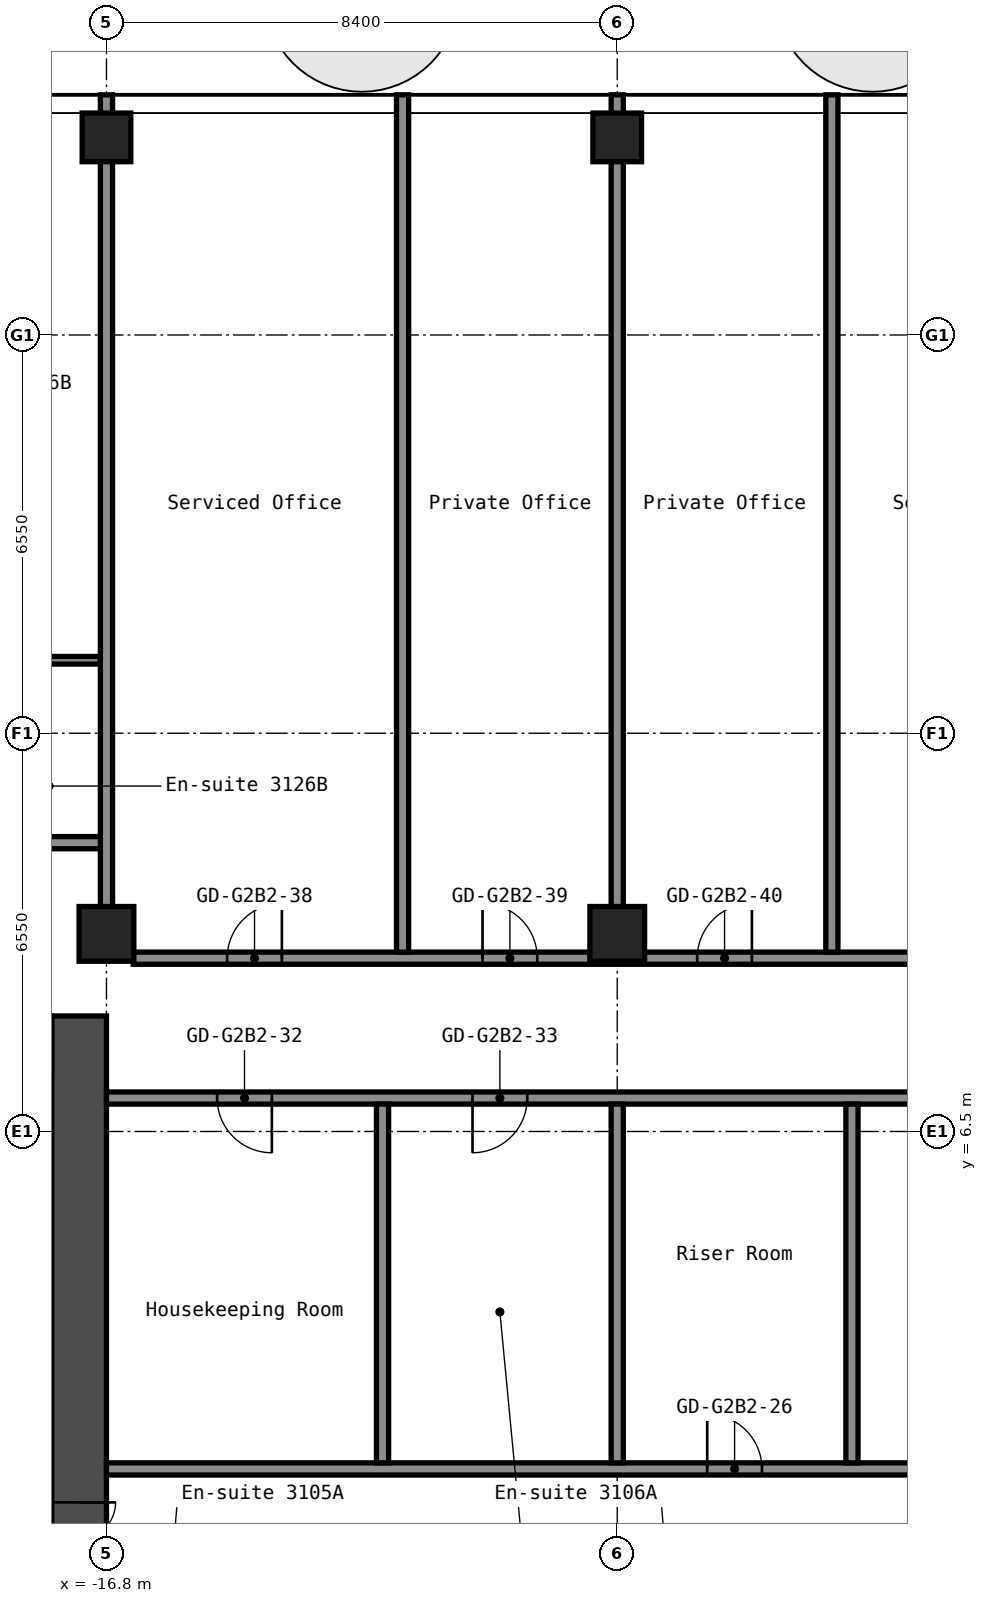
"""IFC4 building model, lengths in metres.
Left out: names, types, materials, properties, quantities, classifications, styles, units other than length and angle.
Written with IfcOpenShell. Run it as: python <this file> out.ifc"""

import sys

from ifc_helpers import new_model, si_unit, direction, frame, frame_2d, origin, origin_2d, place, context, subcontext, project, spatial, rectangle, hollow_rectangle, extrude, element, fill, save


model = new_model("IFC4")
c1 = context("Model", 3, precision=1e-05, world=origin(), true_north=direction((0.0, 1.0)))
c2 = subcontext(c1, "Body", "Model", "MODEL_VIEW")
j1 = project(units=[si_unit("LENGTHUNIT", "METRE"), si_unit("PLANEANGLEUNIT", "RADIAN")], contexts=[c1])
p1 = place(None, origin())
s1 = spatial("IfcSite", under=j1, at=p1, CompositionType="ELEMENT")
p2 = place(p1, origin())
s2 = spatial("IfcBuilding", under=s1, at=p2, CompositionType="ELEMENT")
p3 = place(p2, frame((0.0, 0.0, 110.6)))
s3 = spatial("IfcBuildingStorey", under=s2, at=p3, CompositionType="ELEMENT", Elevation=110.6)
p4 = place(p3, frame((-16.8, 9.75, 0.0), z_axis=(0.0, 0.0, 1.0), x_axis=(1.0, 0.0, 0.0)))
e1 = element("IfcColumn", 1, at=p4, inside=s3, PredefinedType="COLUMN", context=c2, shape_type="SweptSolid", body=[
    extrude(hollow_rectangle(XDim=0.9, YDim=0.9, WallThickness=0.036, at=origin_2d()), origin(), (0.0, 0.0, 1.0), 2.8),
])
p5 = place(p3, frame((-16.8, 22.85, 0.0), z_axis=(0.0, 0.0, 1.0), x_axis=(1.0, 0.0, 0.0)))
e2 = element("IfcColumn", 2, at=p5, inside=s3, PredefinedType="COLUMN", context=c2, shape_type="SweptSolid", body=[
    extrude(hollow_rectangle(XDim=0.8, YDim=0.8, WallThickness=0.032, at=origin_2d()), origin(), (0.0, 0.0, 1.0), 2.8),
])
p6 = place(p3, frame((-8.4, 9.75, 0.0), z_axis=(0.0, 0.0, 1.0), x_axis=(1.0, 0.0, 0.0)))
e3 = element("IfcColumn", 3, at=p6, inside=s3, PredefinedType="COLUMN", context=c2, shape_type="SweptSolid", body=[
    extrude(hollow_rectangle(XDim=0.9, YDim=0.9, WallThickness=0.036, at=origin_2d()), origin(), (0.0, 0.0, 1.0), 2.8),
])
p7 = place(p3, frame((-8.4, 22.85, 0.0), z_axis=(0.0, 0.0, 1.0), x_axis=(1.0, 0.0, 0.0)))
e4 = element("IfcColumn", 4, at=p7, inside=s3, PredefinedType="COLUMN", context=c2, shape_type="SweptSolid", body=[
    extrude(hollow_rectangle(XDim=0.8, YDim=0.8, WallThickness=0.032, at=origin_2d()), origin(), (0.0, 0.0, 1.0), 2.8),
])
p8 = place(p3, frame((-17.25, -8.4, 0.0), z_axis=(0.0, 0.0, 1.0), x_axis=(0.0, 1.0, 0.0)))
e5 = element("IfcWall", 5, at=p8, inside=s3, PredefinedType="SHEAR", context=c2, shape_type="SweptSolid", body=[
    extrude(rectangle(XDim=16.8, YDim=0.9, at=frame_2d((8.4, 0.0))), origin(), (0.0, 0.0, 1.0), 2.8),
])
p9 = place(p8, frame((7.6, 0.0, 0.0)))
e6 = element("IfcOpeningElement", 6, at=p9, cuts=e5, PredefinedType="OPENING", context=c2, shape_type="SweptSolid", body=[
    extrude(rectangle(XDim=1.2, YDim=2.1, at=frame_2d((0.6, 1.05))), frame((0.0, 0.46, 0.0), z_axis=(0.0, -1.0, 0.0), x_axis=(1.0, 0.0, 0.0)), (0.0, 0.0, 1.0), 0.92),
])
p10 = place(p3, frame((-32.7, 7.95, 0.0), z_axis=(0.0, 0.0, 1.0), x_axis=(1.0, 0.0, 0.0)))
e7 = element("IfcWall", 7, at=p10, inside=s3, PredefinedType="SHEAR", context=c2, shape_type="SweptSolid", body=[
    extrude(rectangle(XDim=15.0, YDim=0.9, at=frame_2d((7.5, 0.0))), origin(), (0.0, 0.0, 1.0), 2.8),
])
p11 = place(p10, frame((3.4, 0.0, 0.0)))
e8 = element("IfcOpeningElement", 8, at=p11, cuts=e7, PredefinedType="OPENING", context=c2, shape_type="SweptSolid", body=[
    extrude(rectangle(XDim=1.2, YDim=2.1, at=frame_2d((0.6, 1.05))), frame((0.0, 0.46, 0.0), z_axis=(0.0, -1.0, 0.0), x_axis=(1.0, 0.0, 0.0)), (0.0, 0.0, 1.0), 0.92),
])
p12 = place(p10, frame((0.75, 0.0, 0.0)))
e9 = element("IfcOpeningElement", 9, at=p12, cuts=e7, PredefinedType="OPENING", context=c2, shape_type="SweptSolid", body=[
    extrude(rectangle(XDim=0.9, YDim=2.1, at=frame_2d((0.45, 1.05))), frame((0.0, 0.46, 0.0), z_axis=(0.0, -1.0, 0.0), x_axis=(1.0, 0.0, 0.0)), (0.0, 0.0, 1.0), 0.92),
])
p13 = place(p3, frame((-16.8, 0.95, 0.0), z_axis=(0.0, 0.0, 1.0), x_axis=(1.0, 0.0, 0.0)))
e10 = element("IfcWall", 10, at=p13, inside=s3, PredefinedType="PARTITIONING", context=c2, shape_type="SweptSolid", body=[
    extrude(rectangle(XDim=33.6, YDim=0.2, at=frame_2d((16.8, 0.0))), origin(), (0.0, 0.0, 1.0), 2.8),
])
p14 = place(p13, frame((9.88, 0.0, 0.0)))
e11 = element("IfcOpeningElement", 11, at=p14, cuts=e10, PredefinedType="OPENING", context=c2, shape_type="SweptSolid", body=[
    extrude(rectangle(XDim=0.9, YDim=2.1, at=frame_2d((0.45, 1.05))), frame((0.0, 0.11, 0.0), z_axis=(0.0, -1.0, 0.0), x_axis=(1.0, 0.0, 0.0)), (0.0, 0.0, 1.0), 0.22),
])
p15 = place(p13, frame((14.08, 0.0, 0.0)))
e12 = element("IfcOpeningElement", 12, at=p15, cuts=e10, PredefinedType="OPENING", context=c2, shape_type="SweptSolid", body=[
    extrude(rectangle(XDim=0.9, YDim=2.1, at=frame_2d((0.45, 1.05))), frame((0.0, 0.11, 0.0), z_axis=(0.0, -1.0, 0.0), x_axis=(1.0, 0.0, 0.0)), (0.0, 0.0, 1.0), 0.22),
])
p16 = place(p13, frame((26.345, 0.0, 0.0)))
e13 = element("IfcOpeningElement", 13, at=p16, cuts=e10, PredefinedType="OPENING", context=c2, shape_type="SweptSolid", body=[
    extrude(rectangle(XDim=0.9, YDim=2.1, at=frame_2d((0.45, 1.05))), frame((0.0, 0.11, 0.0), z_axis=(0.0, -1.0, 0.0), x_axis=(1.0, 0.0, 0.0)), (0.0, 0.0, 1.0), 0.22),
])
p17 = place(p13, frame((30.545, 0.0, 0.0)))
e14 = element("IfcOpeningElement", 14, at=p17, cuts=e10, PredefinedType="OPENING", context=c2, shape_type="SweptSolid", body=[
    extrude(rectangle(XDim=0.9, YDim=2.1, at=frame_2d((0.45, 1.05))), frame((0.0, 0.11, 0.0), z_axis=(0.0, -1.0, 0.0), x_axis=(1.0, 0.0, 0.0)), (0.0, 0.0, 1.0), 0.22),
])
p18 = place(p3, frame((-16.8, 7.05, 0.0), z_axis=(0.0, 0.0, 1.0), x_axis=(1.0, 0.0, 0.0)))
e15 = element("IfcWall", 15, at=p18, inside=s3, PredefinedType="PARTITIONING", context=c2, shape_type="SweptSolid", body=[
    extrude(rectangle(XDim=33.6, YDim=0.2, at=frame_2d((16.8, 0.0))), origin(), (0.0, 0.0, 1.0), 2.8),
])
p19 = place(p18, frame((1.82, 0.0, 0.0)))
e16 = element("IfcOpeningElement", 16, at=p19, cuts=e15, PredefinedType="OPENING", context=c2, shape_type="SweptSolid", body=[
    extrude(rectangle(XDim=0.9, YDim=2.1, at=frame_2d((0.45, 1.05))), frame((0.0, 0.11, 0.0), z_axis=(0.0, -1.0, 0.0), x_axis=(1.0, 0.0, 0.0)), (0.0, 0.0, 1.0), 0.22),
])
p20 = place(p18, frame((6.02, 0.0, 0.0)))
e17 = element("IfcOpeningElement", 17, at=p20, cuts=e15, PredefinedType="OPENING", context=c2, shape_type="SweptSolid", body=[
    extrude(rectangle(XDim=0.9, YDim=2.1, at=frame_2d((0.45, 1.05))), frame((0.0, 0.11, 0.0), z_axis=(0.0, -1.0, 0.0), x_axis=(1.0, 0.0, 0.0)), (0.0, 0.0, 1.0), 0.22),
])
p21 = place(p18, frame((18.2, 0.0, 0.0)))
e18 = element("IfcOpeningElement", 18, at=p21, cuts=e15, PredefinedType="OPENING", context=c2, shape_type="SweptSolid", body=[
    extrude(rectangle(XDim=0.9, YDim=2.1, at=frame_2d((0.45, 1.05))), frame((0.0, 0.11, 0.0), z_axis=(0.0, -1.0, 0.0), x_axis=(1.0, 0.0, 0.0)), (0.0, 0.0, 1.0), 0.22),
])
p22 = place(p18, frame((22.4, 0.0, 0.0)))
e19 = element("IfcOpeningElement", 19, at=p22, cuts=e15, PredefinedType="OPENING", context=c2, shape_type="SweptSolid", body=[
    extrude(rectangle(XDim=0.9, YDim=2.1, at=frame_2d((0.45, 1.05))), frame((0.0, 0.11, 0.0), z_axis=(0.0, -1.0, 0.0), x_axis=(1.0, 0.0, 0.0)), (0.0, 0.0, 1.0), 0.22),
])
p23 = place(p3, frame((-16.36, 9.35, 0.0), z_axis=(0.0, 0.0, 1.0), x_axis=(1.0, 0.0, 0.0)))
e20 = element("IfcWall", 20, at=p23, inside=s3, PredefinedType="PARTITIONING", context=c2, shape_type="SweptSolid", body=[
    extrude(rectangle(XDim=32.72, YDim=0.2, at=frame_2d((16.36, 0.0))), origin(), (0.0, 0.0, 1.0), 2.8),
])
p24 = place(p23, frame((1.545, 0.0, 0.0)))
e21 = element("IfcOpeningElement", 21, at=p24, cuts=e20, PredefinedType="OPENING", context=c2, shape_type="SweptSolid", body=[
    extrude(rectangle(XDim=0.9, YDim=2.1, at=frame_2d((0.45, 1.05))), frame((0.0, 0.11, 0.0), z_axis=(0.0, -1.0, 0.0), x_axis=(1.0, 0.0, 0.0)), (0.0, 0.0, 1.0), 0.22),
])
p25 = place(p23, frame((5.745, 0.0, 0.0)))
e22 = element("IfcOpeningElement", 22, at=p25, cuts=e20, PredefinedType="OPENING", context=c2, shape_type="SweptSolid", body=[
    extrude(rectangle(XDim=0.9, YDim=2.1, at=frame_2d((0.45, 1.05))), frame((0.0, 0.11, 0.0), z_axis=(0.0, -1.0, 0.0), x_axis=(1.0, 0.0, 0.0)), (0.0, 0.0, 1.0), 0.22),
])
p26 = place(p23, frame((9.275, 0.0, 0.0)))
e23 = element("IfcOpeningElement", 23, at=p26, cuts=e20, PredefinedType="OPENING", context=c2, shape_type="SweptSolid", body=[
    extrude(rectangle(XDim=0.9, YDim=2.1, at=frame_2d((0.45, 1.05))), frame((0.0, 0.11, 0.0), z_axis=(0.0, -1.0, 0.0), x_axis=(1.0, 0.0, 0.0)), (0.0, 0.0, 1.0), 0.22),
])
p27 = place(p23, frame((13.475, 0.0, 0.0)))
e24 = element("IfcOpeningElement", 24, at=p27, cuts=e20, PredefinedType="OPENING", context=c2, shape_type="SweptSolid", body=[
    extrude(rectangle(XDim=0.9, YDim=2.1, at=frame_2d((0.45, 1.05))), frame((0.0, 0.11, 0.0), z_axis=(0.0, -1.0, 0.0), x_axis=(1.0, 0.0, 0.0)), (0.0, 0.0, 1.0), 0.22),
])
p28 = place(p23, frame((19.21, 0.0, 0.0)))
e25 = element("IfcOpeningElement", 25, at=p28, cuts=e20, PredefinedType="OPENING", context=c2, shape_type="SweptSolid", body=[
    extrude(rectangle(XDim=1.0, YDim=2.1, at=frame_2d((0.5, 1.05))), frame((0.0, 0.11, 0.0), z_axis=(0.0, -1.0, 0.0), x_axis=(1.0, 0.0, 0.0)), (0.0, 0.0, 1.0), 0.22),
])
p29 = place(p23, frame((20.91, 0.0, 0.0)))
e26 = element("IfcOpeningElement", 26, at=p29, cuts=e20, PredefinedType="OPENING", context=c2, shape_type="SweptSolid", body=[
    extrude(rectangle(XDim=1.0, YDim=2.1, at=frame_2d((0.5, 1.05))), frame((0.0, 0.11, 0.0), z_axis=(0.0, -1.0, 0.0), x_axis=(1.0, 0.0, 0.0)), (0.0, 0.0, 1.0), 0.22),
])
p30 = place(p23, frame((27.61, 0.0, 0.0)))
e27 = element("IfcOpeningElement", 27, at=p30, cuts=e20, PredefinedType="OPENING", context=c2, shape_type="SweptSolid", body=[
    extrude(rectangle(XDim=1.0, YDim=2.1, at=frame_2d((0.5, 1.05))), frame((0.0, 0.11, 0.0), z_axis=(0.0, -1.0, 0.0), x_axis=(1.0, 0.0, 0.0)), (0.0, 0.0, 1.0), 0.22),
])
p31 = place(p23, frame((29.31, 0.0, 0.0)))
e28 = element("IfcOpeningElement", 28, at=p31, cuts=e20, PredefinedType="OPENING", context=c2, shape_type="SweptSolid", body=[
    extrude(rectangle(XDim=1.0, YDim=2.1, at=frame_2d((0.5, 1.05))), frame((0.0, 0.11, 0.0), z_axis=(0.0, -1.0, 0.0), x_axis=(1.0, 0.0, 0.0)), (0.0, 0.0, 1.0), 0.22),
])
p32 = place(p3, frame((-46.5, 11.25, 0.0), z_axis=(0.0, 0.0, 1.0), x_axis=(1.0, 0.0, 0.0)))
e29 = element("IfcWall", 29, at=p32, inside=s3, PredefinedType="PARTITIONING", context=c2, shape_type="SweptSolid", body=[
    extrude(rectangle(XDim=29.7, YDim=0.2, at=frame_2d((14.85, 0.0))), origin(), (0.0, 0.0, 1.0), 2.8),
])
p33 = place(p32, frame((1.95, 0.0, 0.0)))
e30 = element("IfcOpeningElement", 30, at=p33, cuts=e29, PredefinedType="OPENING", context=c2, shape_type="SweptSolid", body=[
    extrude(rectangle(XDim=0.9, YDim=2.1, at=frame_2d((0.45, 1.05))), frame((0.0, 0.11, 0.0), z_axis=(0.0, -1.0, 0.0), x_axis=(1.0, 0.0, 0.0)), (0.0, 0.0, 1.0), 0.22),
])
p34 = place(p32, frame((7.35, 0.0, 0.0)))
e31 = element("IfcOpeningElement", 31, at=p34, cuts=e29, PredefinedType="OPENING", context=c2, shape_type="SweptSolid", body=[
    extrude(rectangle(XDim=1.0, YDim=2.1, at=frame_2d((0.5, 1.05))), frame((0.0, 0.11, 0.0), z_axis=(0.0, -1.0, 0.0), x_axis=(1.0, 0.0, 0.0)), (0.0, 0.0, 1.0), 0.22),
])
p35 = place(p32, frame((9.05, 0.0, 0.0)))
e32 = element("IfcOpeningElement", 32, at=p35, cuts=e29, PredefinedType="OPENING", context=c2, shape_type="SweptSolid", body=[
    extrude(rectangle(XDim=1.0, YDim=2.1, at=frame_2d((0.5, 1.05))), frame((0.0, 0.11, 0.0), z_axis=(0.0, -1.0, 0.0), x_axis=(1.0, 0.0, 0.0)), (0.0, 0.0, 1.0), 0.22),
])
p36 = place(p32, frame((15.75, 0.0, 0.0)))
e33 = element("IfcOpeningElement", 33, at=p36, cuts=e29, PredefinedType="OPENING", context=c2, shape_type="SweptSolid", body=[
    extrude(rectangle(XDim=1.0, YDim=2.1, at=frame_2d((0.5, 1.05))), frame((0.0, 0.11, 0.0), z_axis=(0.0, -1.0, 0.0), x_axis=(1.0, 0.0, 0.0)), (0.0, 0.0, 1.0), 0.22),
])
p37 = place(p32, frame((17.45, 0.0, 0.0)))
e34 = element("IfcOpeningElement", 34, at=p37, cuts=e29, PredefinedType="OPENING", context=c2, shape_type="SweptSolid", body=[
    extrude(rectangle(XDim=1.0, YDim=2.1, at=frame_2d((0.5, 1.05))), frame((0.0, 0.11, 0.0), z_axis=(0.0, -1.0, 0.0), x_axis=(1.0, 0.0, 0.0)), (0.0, 0.0, 1.0), 0.22),
])
p38 = place(p32, frame((24.15, 0.0, 0.0)))
e35 = element("IfcOpeningElement", 35, at=p38, cuts=e29, PredefinedType="OPENING", context=c2, shape_type="SweptSolid", body=[
    extrude(rectangle(XDim=1.0, YDim=2.1, at=frame_2d((0.5, 1.05))), frame((0.0, 0.11, 0.0), z_axis=(0.0, -1.0, 0.0), x_axis=(1.0, 0.0, 0.0)), (0.0, 0.0, 1.0), 0.22),
])
p39 = place(p32, frame((25.85, 0.0, 0.0)))
e36 = element("IfcOpeningElement", 36, at=p39, cuts=e29, PredefinedType="OPENING", context=c2, shape_type="SweptSolid", body=[
    extrude(rectangle(XDim=1.0, YDim=2.1, at=frame_2d((0.5, 1.05))), frame((0.0, 0.11, 0.0), z_axis=(0.0, -1.0, 0.0), x_axis=(1.0, 0.0, 0.0)), (0.0, 0.0, 1.0), 0.22),
])
p40 = place(p3, frame((-19.238, 14.25, 0.0), z_axis=(0.0, 0.0, 1.0), x_axis=(1.0, 0.0, 0.0)))
e37 = element("IfcWall", 37, at=p40, inside=s3, PredefinedType="PARTITIONING", context=c2, shape_type="SweptSolid", body=[
    extrude(rectangle(XDim=2.338, YDim=0.125, at=frame_2d((1.169, 0.0))), origin(), (0.0, 0.0, 1.0), 2.8),
])
p41 = place(p3, frame((-16.8, 10.19, 0.0), z_axis=(0.0, 0.0, 1.0), x_axis=(0.0, 1.0, 0.0)))
e38 = element("IfcWall", 38, at=p41, inside=s3, PredefinedType="PARTITIONING", context=c2, shape_type="SweptSolid", body=[
    extrude(rectangle(XDim=13.36, YDim=0.2, at=frame_2d((6.68, 0.0))), origin(), (0.0, 0.0, 1.0), 2.8),
])
p42 = place(p3, frame((-12.26, 1.05, 0.0), z_axis=(0.0, 0.0, 1.0), x_axis=(0.0, 1.0, 0.0)))
e39 = element("IfcWall", 39, at=p42, inside=s3, PredefinedType="PARTITIONING", context=c2, shape_type="SweptSolid", body=[
    extrude(rectangle(XDim=5.9, YDim=0.2, at=frame_2d((2.95, 0.0))), origin(), (0.0, 0.0, 1.0), 2.8),
])
p43 = place(p3, frame((-11.93, 9.45, 0.0), z_axis=(0.0, 0.0, 1.0), x_axis=(0.0, 1.0, 0.0)))
e40 = element("IfcWall", 40, at=p43, inside=s3, PredefinedType="PARTITIONING", context=c2, shape_type="SweptSolid", body=[
    extrude(rectangle(XDim=14.1, YDim=0.2, at=frame_2d((7.05, 0.0))), origin(), (0.0, 0.0, 1.0), 2.8),
])
p44 = place(p3, frame((-8.4, 1.05, 0.0), z_axis=(0.0, 0.0, 1.0), x_axis=(0.0, 1.0, 0.0)))
e41 = element("IfcWall", 41, at=p44, inside=s3, PredefinedType="PARTITIONING", context=c2, shape_type="SweptSolid", body=[
    extrude(rectangle(XDim=5.9, YDim=0.2, at=frame_2d((2.95, 0.0))), origin(), (0.0, 0.0, 1.0), 2.8),
])
p45 = place(p3, frame((-8.4, 10.19, 0.0), z_axis=(0.0, 0.0, 1.0), x_axis=(0.0, 1.0, 0.0)))
e42 = element("IfcWall", 42, at=p45, inside=s3, PredefinedType="PARTITIONING", context=c2, shape_type="SweptSolid", body=[
    extrude(rectangle(XDim=13.36, YDim=0.2, at=frame_2d((6.68, 0.0))), origin(), (0.0, 0.0, 1.0), 2.8),
])
p46 = place(p3, frame((-4.87, 9.45, 0.0), z_axis=(0.0, 0.0, 1.0), x_axis=(0.0, 1.0, 0.0)))
e43 = element("IfcWall", 43, at=p46, inside=s3, PredefinedType="PARTITIONING", context=c2, shape_type="SweptSolid", body=[
    extrude(rectangle(XDim=14.1, YDim=0.2, at=frame_2d((7.05, 0.0))), origin(), (0.0, 0.0, 1.0), 2.8),
])
p47 = place(p3, frame((-4.54, 1.05, 0.0), z_axis=(0.0, 0.0, 1.0), x_axis=(0.0, 1.0, 0.0)))
e44 = element("IfcWall", 44, at=p47, inside=s3, PredefinedType="PARTITIONING", context=c2, shape_type="SweptSolid", body=[
    extrude(rectangle(XDim=5.9, YDim=0.2, at=frame_2d((2.95, 0.0))), origin(), (0.0, 0.0, 1.0), 2.8),
])
p48 = place(p9, origin())
e45 = element("IfcDoor", 45, at=p48, inside=s3, OperationType="DOUBLE_DOOR_SINGLE_SWING", PredefinedType="DOOR", context=c2, shape_type="SweptSolid", body=[
    extrude(rectangle(XDim=1.2, YDim=2.1, at=frame_2d((0.6, 1.05))), frame((0.0, 0.025, 0.0), z_axis=(0.0, -1.0, 0.0), x_axis=(1.0, 0.0, 0.0)), (0.0, 0.0, 1.0), 0.05),
])
fill(e6, e45)
p49 = place(p14, origin())
e46 = element("IfcDoor", 46, at=p49, inside=s3, OperationType="SINGLE_SWING_RIGHT", PredefinedType="DOOR", context=c2, shape_type="SweptSolid", body=[
    extrude(rectangle(XDim=0.9, YDim=2.1, at=frame_2d((0.45, 1.05))), frame((0.0, 0.025, 0.0), z_axis=(0.0, -1.0, 0.0), x_axis=(1.0, 0.0, 0.0)), (0.0, 0.0, 1.0), 0.05),
])
fill(e11, e46)
p50 = place(p19, origin())
e47 = element("IfcDoor", 47, at=p50, inside=s3, OperationType="SINGLE_SWING_RIGHT", PredefinedType="DOOR", context=c2, shape_type="SweptSolid", body=[
    extrude(rectangle(XDim=0.9, YDim=2.1, at=frame_2d((0.45, 1.05))), frame((0.0, 0.025, 0.0), z_axis=(0.0, -1.0, 0.0), x_axis=(1.0, 0.0, 0.0)), (0.0, 0.0, 1.0), 0.05),
])
fill(e16, e47)
p51 = place(p20, origin())
e48 = element("IfcDoor", 48, at=p51, inside=s3, OperationType="SINGLE_SWING_LEFT", PredefinedType="DOOR", context=c2, shape_type="SweptSolid", body=[
    extrude(rectangle(XDim=0.9, YDim=2.1, at=frame_2d((0.45, 1.05))), frame((0.0, 0.025, 0.0), z_axis=(0.0, -1.0, 0.0), x_axis=(1.0, 0.0, 0.0)), (0.0, 0.0, 1.0), 0.05),
])
fill(e17, e48)
p52 = place(p24, origin())
e49 = element("IfcDoor", 49, at=p52, inside=s3, OperationType="SINGLE_SWING_LEFT", PredefinedType="DOOR", context=c2, shape_type="SweptSolid", body=[
    extrude(rectangle(XDim=0.9, YDim=2.1, at=frame_2d((0.45, 1.05))), frame((0.0, 0.025, 0.0), z_axis=(0.0, -1.0, 0.0), x_axis=(1.0, 0.0, 0.0)), (0.0, 0.0, 1.0), 0.05),
])
fill(e21, e49)
p53 = place(p25, origin())
e50 = element("IfcDoor", 50, at=p53, inside=s3, OperationType="SINGLE_SWING_RIGHT", PredefinedType="DOOR", context=c2, shape_type="SweptSolid", body=[
    extrude(rectangle(XDim=0.9, YDim=2.1, at=frame_2d((0.45, 1.05))), frame((0.0, 0.025, 0.0), z_axis=(0.0, -1.0, 0.0), x_axis=(1.0, 0.0, 0.0)), (0.0, 0.0, 1.0), 0.05),
])
fill(e22, e50)
p54 = place(p26, origin())
e51 = element("IfcDoor", 51, at=p54, inside=s3, OperationType="SINGLE_SWING_LEFT", PredefinedType="DOOR", context=c2, shape_type="SweptSolid", body=[
    extrude(rectangle(XDim=0.9, YDim=2.1, at=frame_2d((0.45, 1.05))), frame((0.0, 0.025, 0.0), z_axis=(0.0, -1.0, 0.0), x_axis=(1.0, 0.0, 0.0)), (0.0, 0.0, 1.0), 0.05),
])
fill(e23, e51)
save(model, sys.argv[1])
